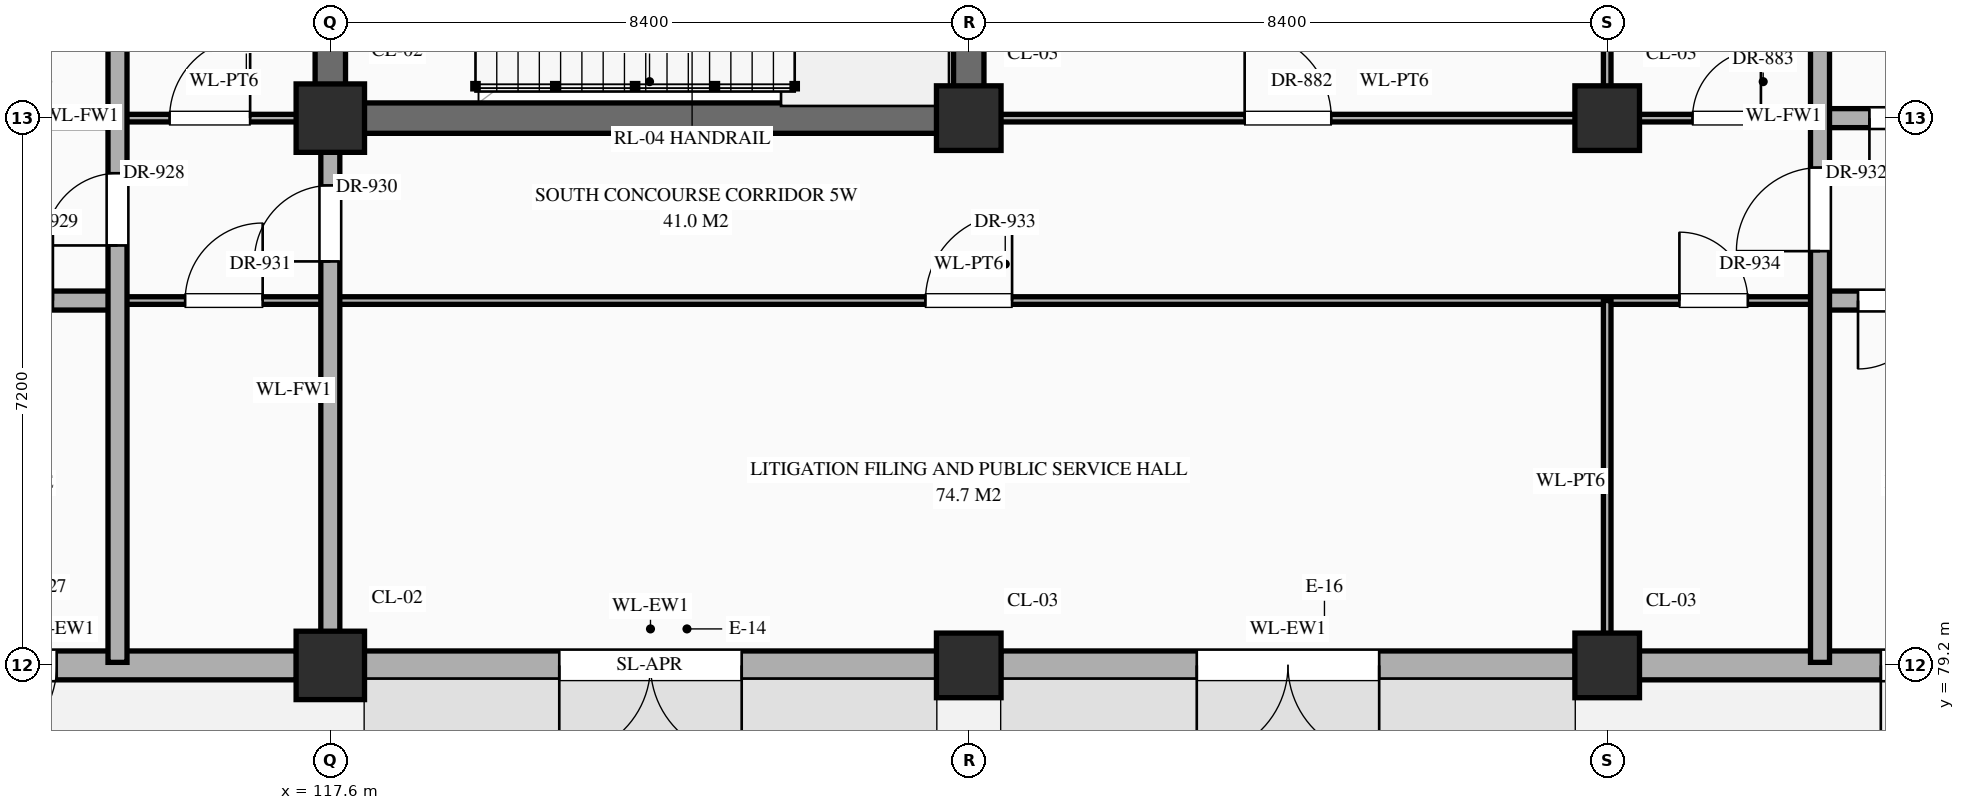
"""IFC4 building model, lengths in metres.
Left out: names, types, materials, properties, quantities, classifications, styles, units other than length and angle.
Written with IfcOpenShell. Run it as: python <this file> out.ifc"""

import sys

from ifc_helpers import new_model, si_unit, direction, frame, frame_2d, origin, origin_2d, place, context, subcontext, project, spatial, rectangle, extrude, element, fill, save


model = new_model("IFC4")
c1 = context("Model", 3, precision=1e-05, world=origin(), true_north=direction((0.0, 1.0)))
c2 = subcontext(c1, "Body", "Model", "MODEL_VIEW")
j1 = project(units=[si_unit("LENGTHUNIT", "METRE"), si_unit("PLANEANGLEUNIT", "RADIAN")], contexts=[c1])
p1 = place(None, origin())
s1 = spatial("IfcSite", under=j1, at=p1, CompositionType="ELEMENT")
p2 = place(p1, origin())
s2 = spatial("IfcBuilding", under=s1, at=p2, CompositionType="ELEMENT")
p3 = place(p2, origin())
s3 = spatial("IfcBuildingStorey", under=s2, at=p3, CompositionType="ELEMENT", Elevation=0.0)
for number, where, z_axis, x_axis in (
    (1, (117.6, 79.2, 0.0), (0.0, 0.0, 1.0), (1.0, 0.0, 0.0)),
    (2, (117.6, 86.4, 0.0), (0.0, 0.0, 1.0), (1.0, 0.0, 0.0)),
):
    element("IfcColumn", number, at=place(p3, frame(where, z_axis=z_axis, x_axis=x_axis)), inside=s3, PredefinedType="COLUMN", context=c2, shape_type="SweptSolid", body=[
        extrude(rectangle(XDim=0.9, YDim=0.9, at=origin_2d()), origin(), (0.0, 0.0, 1.0), 5.4),
    ])
for number, where, z_axis, x_axis in (
    (3, (126.0, 79.2, 0.0), (0.0, 0.0, 1.0), (1.0, 0.0, 0.0)),
    (4, (126.0, 86.4, 0.0), (0.0, 0.0, 1.0), (1.0, 0.0, 0.0)),
    (5, (134.4, 79.2, 0.0), (0.0, 0.0, 1.0), (1.0, 0.0, 0.0)),
    (6, (134.4, 86.4, 0.0), (0.0, 0.0, 1.0), (1.0, 0.0, 0.0)),
):
    element("IfcColumn", number, at=place(p3, frame(where, z_axis=z_axis, x_axis=x_axis)), inside=s3, PredefinedType="COLUMN", context=c2, shape_type="SweptSolid", body=[
        extrude(rectangle(XDim=0.85, YDim=0.85, at=origin_2d()), origin(), (0.0, 0.0, 1.0), 5.4),
    ])
p4 = place(p3, frame((109.645, 79.2, 0.0), z_axis=(0.0, 0.0, 1.0), x_axis=(1.0, 0.0, 0.0)))
e7 = element("IfcWall", 7, at=p4, inside=s3, PredefinedType="STANDARD", context=c2, shape_type="SweptSolid", body=[
    extrude(rectangle(XDim=7.51, YDim=0.38, at=frame_2d((3.755, 0.0))), origin(), (0.0, 0.0, 1.0), 4.47),
])
p5 = place(p4, frame((3.155, 0.0, 0.0)))
e8 = element("IfcOpeningElement", 8, at=p5, cuts=e7, PredefinedType="OPENING", context=c2, shape_type="SweptSolid", body=[
    extrude(rectangle(XDim=1.2, YDim=2.2, at=frame_2d((0.6, 1.1))), frame((0.0, 0.202, 0.0), z_axis=(0.0, -1.0, 0.0), x_axis=(1.0, 0.0, 0.0)), (0.0, 0.0, 1.0), 0.404),
])
p6 = place(p3, frame((118.045, 79.2, 0.0), z_axis=(0.0, 0.0, 1.0), x_axis=(1.0, 0.0, 0.0)))
e9 = element("IfcWall", 9, at=p6, inside=s3, PredefinedType="STANDARD", context=c2, shape_type="SweptSolid", body=[
    extrude(rectangle(XDim=7.535, YDim=0.38, at=frame_2d((3.768, 0.0))), origin(), (0.0, 0.0, 1.0), 4.47),
])
p7 = place(p6, frame((2.567, 0.0, 0.0)))
e10 = element("IfcOpeningElement", 10, at=p7, cuts=e9, PredefinedType="OPENING", context=c2, shape_type="SweptSolid", body=[
    extrude(rectangle(XDim=2.4, YDim=2.4, at=frame_2d((1.2, 1.2))), frame((0.0, 0.202, 0.0), z_axis=(0.0, -1.0, 0.0), x_axis=(1.0, 0.0, 0.0)), (0.0, 0.0, 1.0), 0.404),
])
p8 = place(p3, frame((126.42, 79.2, 0.0), z_axis=(0.0, 0.0, 1.0), x_axis=(1.0, 0.0, 0.0)))
e11 = element("IfcWall", 11, at=p8, inside=s3, PredefinedType="STANDARD", context=c2, shape_type="SweptSolid", body=[
    extrude(rectangle(XDim=7.56, YDim=0.38, at=frame_2d((3.78, 0.0))), origin(), (0.0, 0.0, 1.0), 4.47),
])
p9 = place(p8, frame((2.58, 0.0, 0.0)))
e12 = element("IfcOpeningElement", 12, at=p9, cuts=e11, PredefinedType="OPENING", context=c2, shape_type="SweptSolid", body=[
    extrude(rectangle(XDim=2.4, YDim=2.4, at=frame_2d((1.2, 1.2))), frame((0.0, 0.202, 0.0), z_axis=(0.0, -1.0, 0.0), x_axis=(1.0, 0.0, 0.0)), (0.0, 0.0, 1.0), 0.404),
])
p10 = place(p3, frame((134.82, 79.2, 0.0), z_axis=(0.0, 0.0, 1.0), x_axis=(1.0, 0.0, 0.0)))
e13 = element("IfcWall", 13, at=p10, inside=s3, PredefinedType="STANDARD", context=c2, shape_type="SweptSolid", body=[
    extrude(rectangle(XDim=7.56, YDim=0.38, at=frame_2d((3.78, 0.0))), origin(), (0.0, 0.0, 1.0), 4.47),
])
p11 = place(p10, frame((3.18, 0.0, 0.0)))
e14 = element("IfcOpeningElement", 14, at=p11, cuts=e13, PredefinedType="OPENING", context=c2, shape_type="SweptSolid", body=[
    extrude(rectangle(XDim=1.2, YDim=2.2, at=frame_2d((0.6, 1.1))), frame((0.0, 0.202, 0.0), z_axis=(0.0, -1.0, 0.0), x_axis=(1.0, 0.0, 0.0)), (0.0, 0.0, 1.0), 0.404),
])
p12 = place(p3, frame((112.0, 84.0, 0.0), z_axis=(0.0, 0.0, 1.0), x_axis=(1.0, 0.0, 0.0)))
e15 = element("IfcWall", 15, at=p12, inside=s3, PredefinedType="STANDARD", context=c2, shape_type="SweptSolid", body=[
    extrude(rectangle(XDim=2.8, YDim=0.25, at=frame_2d((1.4, 0.0))), origin(), (0.0, 0.0, 1.0), 5.12),
])
p13 = place(p12, frame((0.85, 0.0, 0.0)))
e16 = element("IfcOpeningElement", 16, at=p13, cuts=e15, PredefinedType="OPENING", context=c2, shape_type="SweptSolid", body=[
    extrude(rectangle(XDim=1.1, YDim=2.2, at=frame_2d((0.55, 1.1))), frame((0.0, 0.137, 0.0), z_axis=(0.0, -1.0, 0.0), x_axis=(1.0, 0.0, 0.0)), (0.0, 0.0, 1.0), 0.274),
])
p14 = place(p3, frame((114.8, 84.0, 0.0), z_axis=(0.0, 0.0, 1.0), x_axis=(1.0, 0.0, 0.0)))
e17 = element("IfcWall", 17, at=p14, inside=s3, PredefinedType="STANDARD", context=c2, shape_type="SweptSolid", body=[
    extrude(rectangle(XDim=22.4, YDim=0.1, at=frame_2d((11.2, 0.0))), origin(), (0.0, 0.0, 1.0), 5.12),
])
p15 = place(p14, frame((0.89, 0.0, 0.0)))
e18 = element("IfcOpeningElement", 18, at=p15, cuts=e17, PredefinedType="OPENING", context=c2, shape_type="SweptSolid", body=[
    extrude(rectangle(XDim=1.02, YDim=2.4, at=frame_2d((0.51, 1.2))), frame((0.0, 0.062, 0.0), z_axis=(0.0, -1.0, 0.0), x_axis=(1.0, 0.0, 0.0)), (0.0, 0.0, 1.0), 0.124),
])
p16 = place(p14, frame((10.63, 0.0, 0.0)))
e19 = element("IfcOpeningElement", 19, at=p16, cuts=e17, PredefinedType="OPENING", context=c2, shape_type="SweptSolid", body=[
    extrude(rectangle(XDim=1.14, YDim=2.4, at=frame_2d((0.57, 1.2))), frame((0.0, 0.062, 0.0), z_axis=(0.0, -1.0, 0.0), x_axis=(1.0, 0.0, 0.0)), (0.0, 0.0, 1.0), 0.124),
])
p17 = place(p14, frame((20.55, 0.0, 0.0)))
e20 = element("IfcOpeningElement", 20, at=p17, cuts=e17, PredefinedType="OPENING", context=c2, shape_type="SweptSolid", body=[
    extrude(rectangle(XDim=0.9, YDim=2.15, at=frame_2d((0.45, 1.075))), frame((0.0, 0.062, 0.0), z_axis=(0.0, -1.0, 0.0), x_axis=(1.0, 0.0, 0.0)), (0.0, 0.0, 1.0), 0.124),
])
p18 = place(p3, frame((137.2, 84.0, 0.0), z_axis=(0.0, 0.0, 1.0), x_axis=(1.0, 0.0, 0.0)))
e21 = element("IfcWall", 21, at=p18, inside=s3, PredefinedType="STANDARD", context=c2, shape_type="SweptSolid", body=[
    extrude(rectangle(XDim=2.8, YDim=0.25, at=frame_2d((1.4, 0.0))), origin(), (0.0, 0.0, 1.0), 5.12),
])
p19 = place(p18, frame((0.5, 0.0, 0.0)))
e22 = element("IfcOpeningElement", 22, at=p19, cuts=e21, PredefinedType="OPENING", context=c2, shape_type="SweptSolid", body=[
    extrude(rectangle(XDim=1.8, YDim=2.35, at=frame_2d((0.9, 1.175))), frame((0.0, 0.137, 0.0), z_axis=(0.0, -1.0, 0.0), x_axis=(1.0, 0.0, 0.0)), (0.0, 0.0, 1.0), 0.274),
])
p20 = place(p3, frame((112.0, 86.4, 0.0), z_axis=(0.0, 0.0, 1.0), x_axis=(1.0, 0.0, 0.0)))
e23 = element("IfcWall", 23, at=p20, inside=s3, PredefinedType="STANDARD", context=c2, shape_type="SweptSolid", body=[
    extrude(rectangle(XDim=2.8, YDim=0.25, at=frame_2d((1.4, 0.0))), origin(), (0.0, 0.0, 1.0), 4.27),
])
p21 = place(p20, frame((0.925, 0.0, 0.0)))
e24 = element("IfcOpeningElement", 24, at=p21, cuts=e23, PredefinedType="OPENING", context=c2, shape_type="SweptSolid", body=[
    extrude(rectangle(XDim=0.95, YDim=2.15, at=frame_2d((0.475, 1.075))), frame((0.0, 0.137, 0.0), z_axis=(0.0, -1.0, 0.0), x_axis=(1.0, 0.0, 0.0)), (0.0, 0.0, 1.0), 0.274),
])
p22 = place(p3, frame((114.8, 86.4, 0.0), z_axis=(0.0, 0.0, 1.0), x_axis=(1.0, 0.0, 0.0)))
e25 = element("IfcWall", 25, at=p22, inside=s3, PredefinedType="STANDARD", context=c2, shape_type="SweptSolid", body=[
    extrude(rectangle(XDim=2.8, YDim=0.1, at=frame_2d((1.4, 0.0))), origin(), (0.0, 0.0, 1.0), 4.27),
])
p23 = place(p22, frame((0.685, 0.0, 0.0)))
e26 = element("IfcOpeningElement", 26, at=p23, cuts=e25, PredefinedType="OPENING", context=c2, shape_type="SweptSolid", body=[
    extrude(rectangle(XDim=1.06, YDim=2.4, at=frame_2d((0.53, 1.2))), frame((0.0, 0.062, 0.0), z_axis=(0.0, -1.0, 0.0), x_axis=(1.0, 0.0, 0.0)), (0.0, 0.0, 1.0), 0.124),
])
p24 = place(p3, frame((117.6, 86.4, 0.0), z_axis=(0.0, 0.0, 1.0), x_axis=(1.0, 0.0, 0.0)))
e27 = element("IfcWall", 27, at=p24, inside=s3, PredefinedType="SHEAR", context=c2, shape_type="SweptSolid", body=[
    extrude(rectangle(XDim=8.4, YDim=0.4, at=frame_2d((4.2, 0.0))), origin(), (0.0, 0.0, 1.0), 5.12),
])
p25 = place(p3, frame((126.0, 86.4, 0.0), z_axis=(0.0, 0.0, 1.0), x_axis=(1.0, 0.0, 0.0)))
e28 = element("IfcWall", 28, at=p25, inside=s3, PredefinedType="STANDARD", context=c2, shape_type="SweptSolid", body=[
    extrude(rectangle(XDim=11.2, YDim=0.1, at=frame_2d((5.6, 0.0))), origin(), (0.0, 0.0, 1.0), 4.27),
])
p26 = place(p25, frame((3.63, 0.0, 0.0)))
e29 = element("IfcOpeningElement", 29, at=p26, cuts=e28, PredefinedType="OPENING", context=c2, shape_type="SweptSolid", body=[
    extrude(rectangle(XDim=1.14, YDim=2.4, at=frame_2d((0.57, 1.2))), frame((0.0, 0.062, 0.0), z_axis=(0.0, -1.0, 0.0), x_axis=(1.0, 0.0, 0.0)), (0.0, 0.0, 1.0), 0.124),
])
p27 = place(p25, frame((9.522, 0.0, 0.0)))
e30 = element("IfcOpeningElement", 30, at=p27, cuts=e28, PredefinedType="OPENING", context=c2, shape_type="SweptSolid", body=[
    extrude(rectangle(XDim=0.9, YDim=2.15, at=frame_2d((0.45, 1.075))), frame((0.0, 0.062, 0.0), z_axis=(0.0, -1.0, 0.0), x_axis=(1.0, 0.0, 0.0)), (0.0, 0.0, 1.0), 0.124),
])
p28 = place(p3, frame((137.2, 86.4, 0.0), z_axis=(0.0, 0.0, 1.0), x_axis=(1.0, 0.0, 0.0)))
e31 = element("IfcWall", 31, at=p28, inside=s3, PredefinedType="STANDARD", context=c2, shape_type="SweptSolid", body=[
    extrude(rectangle(XDim=2.8, YDim=0.25, at=frame_2d((1.4, 0.0))), origin(), (0.0, 0.0, 1.0), 4.27),
])
p29 = place(p28, frame((0.65, 0.0, 0.0)))
e32 = element("IfcOpeningElement", 32, at=p29, cuts=e31, PredefinedType="OPENING", context=c2, shape_type="SweptSolid", body=[
    extrude(rectangle(XDim=1.5, YDim=2.25, at=frame_2d((0.75, 1.125))), frame((0.0, 0.137, 0.0), z_axis=(0.0, -1.0, 0.0), x_axis=(1.0, 0.0, 0.0)), (0.0, 0.0, 1.0), 0.274),
])
p30 = place(p3, frame((114.8, 79.24, 0.0), z_axis=(0.0, 0.0, 1.0), x_axis=(0.0, 1.0, 0.0)))
e33 = element("IfcWall", 33, at=p30, inside=s3, PredefinedType="STANDARD", context=c2, shape_type="SweptSolid", body=[
    extrude(rectangle(XDim=14.36, YDim=0.25, at=frame_2d((7.18, 0.0))), origin(), (0.0, 0.0, 1.0), 5.12),
])
p31 = place(p30, frame((12.66, 0.0, 0.0)))
e34 = element("IfcOpeningElement", 34, at=p31, cuts=e33, PredefinedType="OPENING", context=c2, shape_type="SweptSolid", body=[
    extrude(rectangle(XDim=1.0, YDim=2.2, at=frame_2d((0.5, 1.1))), frame((0.0, 0.137, 0.0), z_axis=(0.0, -1.0, 0.0), x_axis=(1.0, 0.0, 0.0)), (0.0, 0.0, 1.0), 0.274),
])
p32 = place(p30, frame((5.485, 0.0, 0.0)))
e35 = element("IfcOpeningElement", 35, at=p32, cuts=e33, PredefinedType="OPENING", context=c2, shape_type="SweptSolid", body=[
    extrude(rectangle(XDim=0.95, YDim=2.15, at=frame_2d((0.475, 1.075))), frame((0.0, 0.137, 0.0), z_axis=(0.0, -1.0, 0.0), x_axis=(1.0, 0.0, 0.0)), (0.0, 0.0, 1.0), 0.274),
])
p33 = place(p3, frame((117.6, 79.24, 0.0), z_axis=(0.0, 0.0, 1.0), x_axis=(0.0, 1.0, 0.0)))
e36 = element("IfcWall", 36, at=p33, inside=s3, PredefinedType="STANDARD", context=c2, shape_type="SweptSolid", body=[
    extrude(rectangle(XDim=7.16, YDim=0.25, at=frame_2d((3.58, 0.0))), origin(), (0.0, 0.0, 1.0), 4.37),
])
p34 = place(p33, frame((5.275, 0.0, 0.0)))
e37 = element("IfcOpeningElement", 37, at=p34, cuts=e36, PredefinedType="OPENING", context=c2, shape_type="SweptSolid", body=[
    extrude(rectangle(XDim=1.0, YDim=2.2, at=frame_2d((0.5, 1.1))), frame((0.0, 0.137, 0.0), z_axis=(0.0, -1.0, 0.0), x_axis=(1.0, 0.0, 0.0)), (0.0, 0.0, 1.0), 0.274),
])
for number, where, z_axis, x_axis in (
    (38, (117.6, 86.4, 0.0), (0.0, 0.0, 1.0), (0.0, 1.0, 0.0)),
    (39, (126.0, 86.4, 0.0), (0.0, 0.0, 1.0), (0.0, 1.0, 0.0)),
):
    element("IfcWall", number, at=place(p3, frame(where, z_axis=z_axis, x_axis=x_axis)), inside=s3, PredefinedType="SHEAR", context=c2, shape_type="SweptSolid", body=[
        extrude(rectangle(XDim=4.8, YDim=0.4, at=frame_2d((2.4, 0.0))), origin(), (0.0, 0.0, 1.0), 5.12),
    ])
p35 = place(p3, frame((134.4, 79.24, 0.0), z_axis=(0.0, 0.0, 1.0), x_axis=(0.0, 1.0, 0.0)))
e40 = element("IfcWall", 40, at=p35, inside=s3, PredefinedType="STANDARD", context=c2, shape_type="SweptSolid", body=[
    extrude(rectangle(XDim=4.76, YDim=0.1, at=frame_2d((2.38, 0.0))), origin(), (0.0, 0.0, 1.0), 4.37),
])
p36 = place(p3, frame((134.4, 86.4, 0.0), z_axis=(0.0, 0.0, 1.0), x_axis=(0.0, 1.0, 0.0)))
e41 = element("IfcWall", 41, at=p36, inside=s3, PredefinedType="STANDARD", context=c2, shape_type="SweptSolid", body=[
    extrude(rectangle(XDim=7.2, YDim=0.1, at=frame_2d((3.6, 0.0))), origin(), (0.0, 0.0, 1.0), 4.37),
])
p37 = place(p3, frame((137.2, 79.24, 0.0), z_axis=(0.0, 0.0, 1.0), x_axis=(0.0, 1.0, 0.0)))
e42 = element("IfcWall", 42, at=p37, inside=s3, PredefinedType="STANDARD", context=c2, shape_type="SweptSolid", body=[
    extrude(rectangle(XDim=14.36, YDim=0.25, at=frame_2d((7.18, 0.0))), origin(), (0.0, 0.0, 1.0), 5.12),
])
p38 = place(p37, frame((5.41, 0.0, 0.0)))
e43 = element("IfcOpeningElement", 43, at=p38, cuts=e42, PredefinedType="OPENING", context=c2, shape_type="SweptSolid", body=[
    extrude(rectangle(XDim=1.1, YDim=2.2, at=frame_2d((0.55, 1.1))), frame((0.0, 0.137, 0.0), z_axis=(0.0, -1.0, 0.0), x_axis=(1.0, 0.0, 0.0)), (0.0, 0.0, 1.0), 0.274),
])
p39 = place(p5, frame((1.2, 0.0, 0.0), z_axis=(0.0, 0.0, 1.0), x_axis=(-1.0, 0.0, 0.0)))
e44 = element("IfcDoor", 44, at=p39, inside=s3, OperationType="SINGLE_SWING_RIGHT", PredefinedType="DOOR", context=c2, shape_type="SweptSolid", body=[
    extrude(rectangle(XDim=1.2, YDim=2.2, at=frame_2d((0.6, 1.1))), frame((0.0, 0.025, 0.0), z_axis=(0.0, -1.0, 0.0), x_axis=(1.0, 0.0, 0.0)), (0.0, 0.0, 1.0), 0.05),
])
fill(e8, e44)
p40 = place(p7, frame((2.4, 0.0, 0.0), z_axis=(0.0, 0.0, 1.0), x_axis=(-1.0, 0.0, 0.0)))
e45 = element("IfcDoor", 45, at=p40, inside=s3, OperationType="DOUBLE_DOOR_SINGLE_SWING", PredefinedType="DOOR", context=c2, shape_type="SweptSolid", body=[
    extrude(rectangle(XDim=2.4, YDim=2.4, at=frame_2d((1.2, 1.2))), frame((0.0, 0.025, 0.0), z_axis=(0.0, -1.0, 0.0), x_axis=(1.0, 0.0, 0.0)), (0.0, 0.0, 1.0), 0.05),
])
fill(e10, e45)
p41 = place(p9, frame((2.4, 0.0, 0.0), z_axis=(0.0, 0.0, 1.0), x_axis=(-1.0, 0.0, 0.0)))
e46 = element("IfcDoor", 46, at=p41, inside=s3, OperationType="DOUBLE_DOOR_SINGLE_SWING", PredefinedType="DOOR", context=c2, shape_type="SweptSolid", body=[
    extrude(rectangle(XDim=2.4, YDim=2.4, at=frame_2d((1.2, 1.2))), frame((0.0, 0.025, 0.0), z_axis=(0.0, -1.0, 0.0), x_axis=(1.0, 0.0, 0.0)), (0.0, 0.0, 1.0), 0.05),
])
fill(e12, e46)
p42 = place(p11, frame((1.2, 0.0, 0.0), z_axis=(0.0, 0.0, 1.0), x_axis=(-1.0, 0.0, 0.0)))
e47 = element("IfcDoor", 47, at=p42, inside=s3, OperationType="SINGLE_SWING_RIGHT", PredefinedType="DOOR", context=c2, shape_type="SweptSolid", body=[
    extrude(rectangle(XDim=1.2, YDim=2.2, at=frame_2d((0.6, 1.1))), frame((0.0, 0.025, 0.0), z_axis=(0.0, -1.0, 0.0), x_axis=(1.0, 0.0, 0.0)), (0.0, 0.0, 1.0), 0.05),
])
fill(e14, e47)
p43 = place(p23, origin())
e48 = element("IfcDoor", 48, at=p43, inside=s3, OperationType="SINGLE_SWING_RIGHT", PredefinedType="DOOR", context=c2, shape_type="SweptSolid", body=[
    extrude(rectangle(XDim=1.06, YDim=2.4, at=frame_2d((0.53, 1.2))), frame((0.0, 0.025, 0.0), z_axis=(0.0, -1.0, 0.0), x_axis=(1.0, 0.0, 0.0)), (0.0, 0.0, 1.0), 0.05),
])
fill(e26, e48)
p44 = place(p26, origin())
e49 = element("IfcDoor", 49, at=p44, inside=s3, OperationType="SINGLE_SWING_LEFT", PredefinedType="DOOR", context=c2, shape_type="SweptSolid", body=[
    extrude(rectangle(XDim=1.14, YDim=2.4, at=frame_2d((0.57, 1.2))), frame((0.0, 0.025, 0.0), z_axis=(0.0, -1.0, 0.0), x_axis=(1.0, 0.0, 0.0)), (0.0, 0.0, 1.0), 0.05),
])
fill(e29, e49)
p45 = place(p27, origin())
e50 = element("IfcDoor", 50, at=p45, inside=s3, OperationType="SINGLE_SWING_RIGHT", PredefinedType="DOOR", context=c2, shape_type="SweptSolid", body=[
    extrude(rectangle(XDim=0.9, YDim=2.15, at=frame_2d((0.45, 1.075))), frame((0.0, 0.025, 0.0), z_axis=(0.0, -1.0, 0.0), x_axis=(1.0, 0.0, 0.0)), (0.0, 0.0, 1.0), 0.05),
])
fill(e30, e50)
p46 = place(p29, frame((1.5, 0.0, 0.0), z_axis=(0.0, 0.0, 1.0), x_axis=(-1.0, 0.0, 0.0)))
e51 = element("IfcDoor", 51, at=p46, inside=s3, OperationType="DOUBLE_DOOR_SINGLE_SWING", PredefinedType="DOOR", context=c2, shape_type="SweptSolid", body=[
    extrude(rectangle(XDim=1.5, YDim=2.25, at=frame_2d((0.75, 1.125))), frame((0.0, 0.025, 0.0), z_axis=(0.0, -1.0, 0.0), x_axis=(1.0, 0.0, 0.0)), (0.0, 0.0, 1.0), 0.05),
])
fill(e32, e51)
p47 = place(p32, origin())
e52 = element("IfcDoor", 52, at=p47, inside=s3, OperationType="SINGLE_SWING_LEFT", PredefinedType="DOOR", context=c2, shape_type="SweptSolid", body=[
    extrude(rectangle(XDim=0.95, YDim=2.15, at=frame_2d((0.475, 1.075))), frame((0.0, 0.025, 0.0), z_axis=(0.0, -1.0, 0.0), x_axis=(1.0, 0.0, 0.0)), (0.0, 0.0, 1.0), 0.05),
])
fill(e35, e52)
p48 = place(p13, origin())
e53 = element("IfcDoor", 53, at=p48, inside=s3, OperationType="SINGLE_SWING_RIGHT", PredefinedType="DOOR", context=c2, shape_type="SweptSolid", body=[
    extrude(rectangle(XDim=1.1, YDim=2.2, at=frame_2d((0.55, 1.1))), frame((0.0, 0.025, 0.0), z_axis=(0.0, -1.0, 0.0), x_axis=(1.0, 0.0, 0.0)), (0.0, 0.0, 1.0), 0.05),
])
fill(e16, e53)
p49 = place(p34, origin())
e54 = element("IfcDoor", 54, at=p49, inside=s3, OperationType="SINGLE_SWING_LEFT", PredefinedType="DOOR", context=c2, shape_type="SweptSolid", body=[
    extrude(rectangle(XDim=1.0, YDim=2.2, at=frame_2d((0.5, 1.1))), frame((0.0, 0.025, 0.0), z_axis=(0.0, -1.0, 0.0), x_axis=(1.0, 0.0, 0.0)), (0.0, 0.0, 1.0), 0.05),
])
fill(e37, e54)
p50 = place(p15, origin())
e55 = element("IfcDoor", 55, at=p50, inside=s3, OperationType="SINGLE_SWING_RIGHT", PredefinedType="DOOR", context=c2, shape_type="SweptSolid", body=[
    extrude(rectangle(XDim=1.02, YDim=2.4, at=frame_2d((0.51, 1.2))), frame((0.0, 0.025, 0.0), z_axis=(0.0, -1.0, 0.0), x_axis=(1.0, 0.0, 0.0)), (0.0, 0.0, 1.0), 0.05),
])
fill(e18, e55)
p51 = place(p38, origin())
e56 = element("IfcDoor", 56, at=p51, inside=s3, OperationType="SINGLE_SWING_LEFT", PredefinedType="DOOR", context=c2, shape_type="SweptSolid", body=[
    extrude(rectangle(XDim=1.1, YDim=2.2, at=frame_2d((0.55, 1.1))), frame((0.0, 0.025, 0.0), z_axis=(0.0, -1.0, 0.0), x_axis=(1.0, 0.0, 0.0)), (0.0, 0.0, 1.0), 0.05),
])
fill(e43, e56)
p52 = place(p16, origin())
e57 = element("IfcDoor", 57, at=p52, inside=s3, OperationType="SINGLE_SWING_RIGHT", PredefinedType="DOOR", context=c2, shape_type="SweptSolid", body=[
    extrude(rectangle(XDim=1.14, YDim=2.4, at=frame_2d((0.57, 1.2))), frame((0.0, 0.025, 0.0), z_axis=(0.0, -1.0, 0.0), x_axis=(1.0, 0.0, 0.0)), (0.0, 0.0, 1.0), 0.05),
])
fill(e19, e57)
p53 = place(p17, origin())
e58 = element("IfcDoor", 58, at=p53, inside=s3, OperationType="SINGLE_SWING_LEFT", PredefinedType="DOOR", context=c2, shape_type="SweptSolid", body=[
    extrude(rectangle(XDim=0.9, YDim=2.15, at=frame_2d((0.45, 1.075))), frame((0.0, 0.025, 0.0), z_axis=(0.0, -1.0, 0.0), x_axis=(1.0, 0.0, 0.0)), (0.0, 0.0, 1.0), 0.05),
])
fill(e20, e58)
p54 = place(p19, frame((1.8, 0.0, 0.0), z_axis=(0.0, 0.0, 1.0), x_axis=(-1.0, 0.0, 0.0)))
e59 = element("IfcDoor", 59, at=p54, inside=s3, OperationType="DOUBLE_DOOR_SINGLE_SWING", PredefinedType="DOOR", context=c2, shape_type="SweptSolid", body=[
    extrude(rectangle(XDim=1.8, YDim=2.35, at=frame_2d((0.9, 1.175))), frame((0.0, 0.025, 0.0), z_axis=(0.0, -1.0, 0.0), x_axis=(1.0, 0.0, 0.0)), (0.0, 0.0, 1.0), 0.05),
])
fill(e22, e59)
save(model, sys.argv[1])
